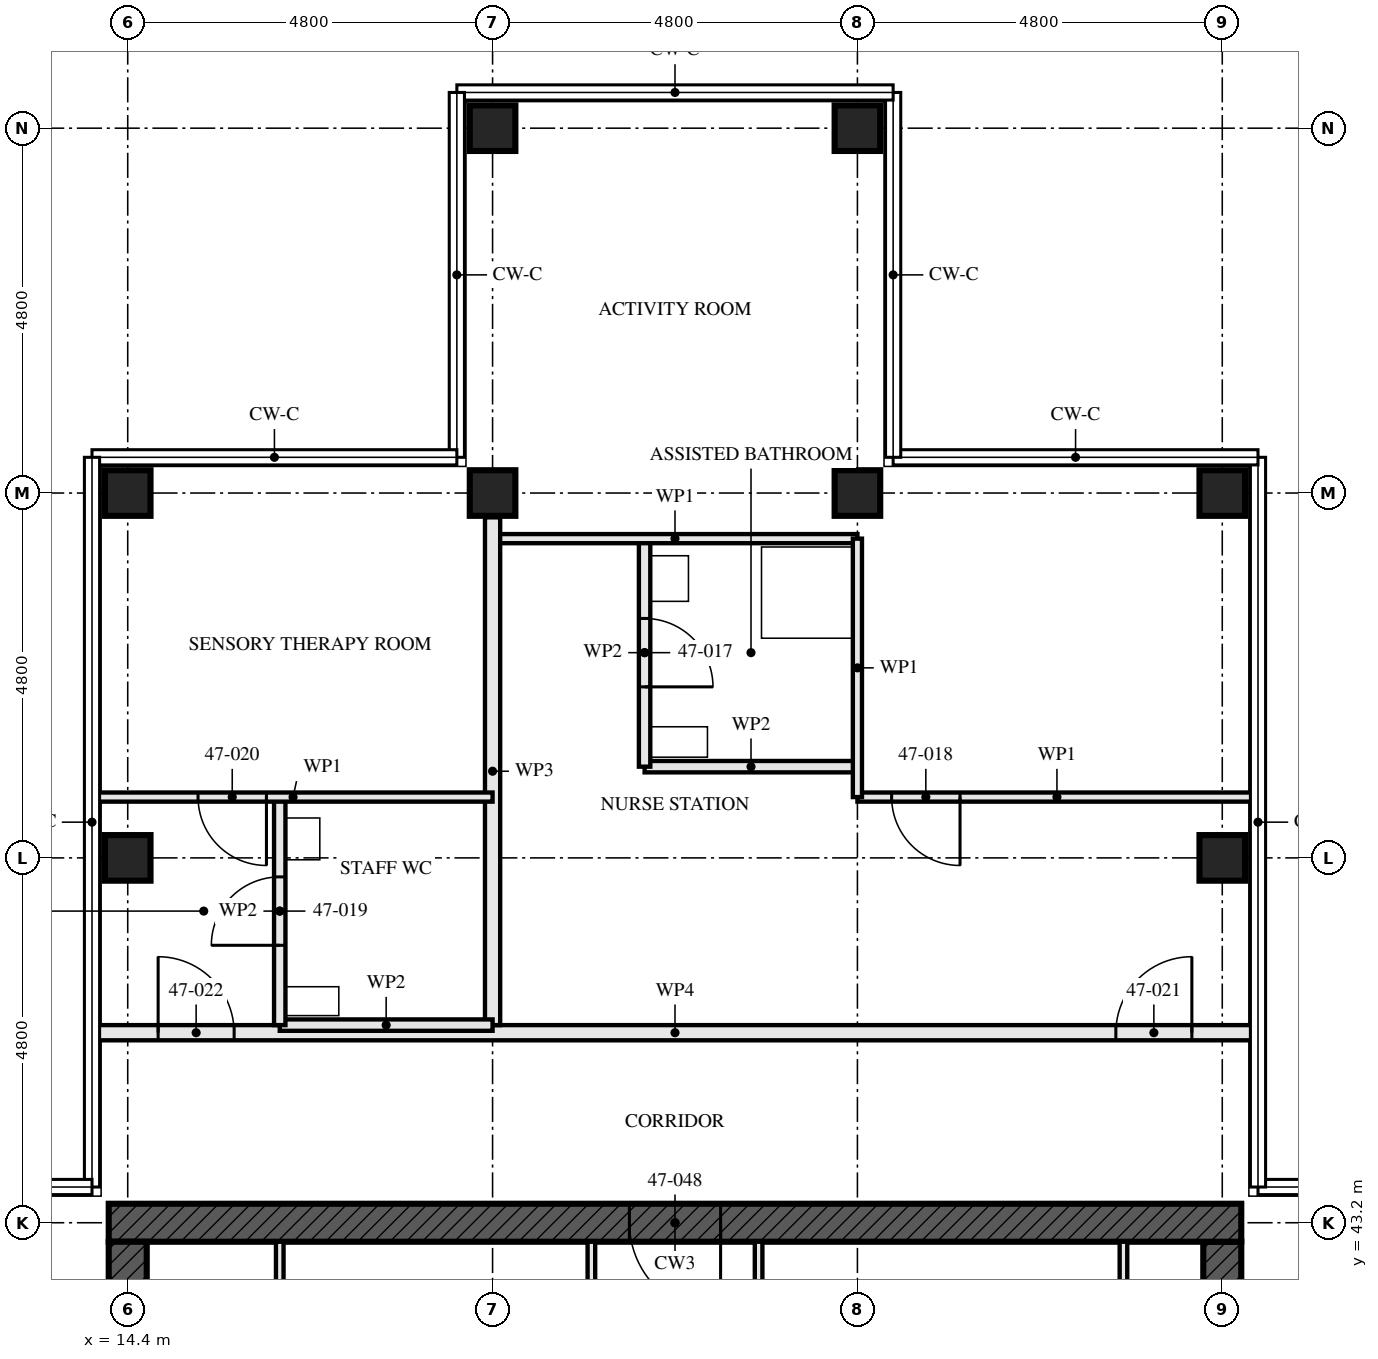
"""IFC4 building model, lengths in metres.
Left out: names, types, materials, properties, quantities, classifications, styles, units other than length and angle.
Written with IfcOpenShell. Run it as: python <this file> out.ifc"""

import sys

from ifc_helpers import new_model, si_unit, direction, frame, frame_2d, origin, origin_2d, place, context, subcontext, project, spatial, rectangle, hollow_rectangle, extrude, element, fill, save


model = new_model("IFC4")
c1 = context("Model", 3, precision=1e-05, world=origin(), true_north=direction((0.0, 1.0)))
c2 = subcontext(c1, "Body", "Model", "MODEL_VIEW")
j1 = project(units=[si_unit("LENGTHUNIT", "METRE"), si_unit("PLANEANGLEUNIT", "RADIAN")], contexts=[c1])
p1 = place(None, origin())
s1 = spatial("IfcSite", under=j1, at=p1, CompositionType="ELEMENT")
p2 = place(p1, origin())
s2 = spatial("IfcBuilding", under=s1, at=p2, CompositionType="ELEMENT")
p3 = place(p2, frame((0.0, 0.0, 172.5)))
s3 = spatial("IfcBuildingStorey", under=s2, at=p3, CompositionType="ELEMENT", Elevation=172.5)
for number, where, z_axis, x_axis in (
    (1, (14.4, 48.0, 0.0), (0.0, 0.0, 1.0), (1.0, 0.0, 0.0)),
    (2, (14.4, 52.8, 0.0), (0.0, 0.0, 1.0), (0.0, 1.0, 0.0)),
    (3, (19.2, 52.8, 0.0), (0.0, 0.0, 1.0), (0.0, 1.0, 0.0)),
    (4, (19.2, 57.6, 0.0), (0.0, 0.0, 1.0), (0.0, 1.0, 0.0)),
    (5, (24.0, 52.8, 0.0), (0.0, 0.0, 1.0), (0.0, 1.0, 0.0)),
    (6, (24.0, 57.6, 0.0), (0.0, 0.0, 1.0), (0.0, 1.0, 0.0)),
    (7, (28.8, 48.0, 0.0), (0.0, 0.0, 1.0), (1.0, 0.0, 0.0)),
    (8, (28.8, 52.8, 0.0), (0.0, 0.0, 1.0), (0.0, 1.0, 0.0)),
):
    element("IfcColumn", number, at=place(p3, frame(where, z_axis=z_axis, x_axis=x_axis)), inside=s3, PredefinedType="COLUMN", context=c2, shape_type="SweptSolid", body=[
        extrude(hollow_rectangle(XDim=0.6, YDim=0.6, WallThickness=0.08, at=origin_2d()), origin(), (0.0, 0.0, 1.0), 3.5),
    ])
p4 = place(p3, frame((29.05, 43.2, -0.17), z_axis=(0.0, 0.0, 1.0), x_axis=(-1.0, 0.0, 0.0)))
e9 = element("IfcWall", 9, at=p4, inside=s3, PredefinedType="SHEAR", context=c2, shape_type="SweptSolid", body=[
    extrude(rectangle(XDim=14.9, YDim=0.5, at=frame_2d((7.45, 0.0))), origin(), (0.0, 0.0, 1.0), 3.5),
])
p5 = place(p4, frame((6.85, 0.0, 0.17)))
e10 = element("IfcOpeningElement", 10, at=p5, cuts=e9, PredefinedType="OPENING", context=c2, shape_type="SweptSolid", body=[
    extrude(rectangle(XDim=1.2, YDim=2.1, at=frame_2d((0.6, 1.05))), frame((0.0, 0.26, 0.0), z_axis=(0.0, -1.0, 0.0), x_axis=(1.0, 0.0, 0.0)), (0.0, 0.0, 1.0), 0.521),
])
p6 = place(p3, frame((14.4, 42.95, -0.17), z_axis=(0.0, 0.0, 1.0), x_axis=(0.0, -1.0, 0.0)))
e11 = element("IfcWall", 11, at=p6, inside=s3, PredefinedType="SHEAR", context=c2, shape_type="SweptSolid", body=[
    extrude(rectangle(XDim=13.9, YDim=0.5, at=frame_2d((6.95, 0.0))), origin(), (0.0, 0.0, 1.0), 3.5),
])
p7 = place(p6, frame((6.35, 0.0, 0.17)))
e12 = element("IfcOpeningElement", 12, at=p7, cuts=e11, PredefinedType="OPENING", context=c2, shape_type="SweptSolid", body=[
    extrude(rectangle(XDim=1.2, YDim=2.1, at=frame_2d((0.6, 1.05))), frame((0.0, 0.26, 0.0), z_axis=(0.0, -1.0, 0.0), x_axis=(1.0, 0.0, 0.0)), (0.0, 0.0, 1.0), 0.521),
])
p8 = place(p3, frame((28.8, 29.05, -0.17), z_axis=(0.0, 0.0, 1.0), x_axis=(0.0, 1.0, 0.0)))
e13 = element("IfcWall", 13, at=p8, inside=s3, PredefinedType="SHEAR", context=c2, shape_type="SweptSolid", body=[
    extrude(rectangle(XDim=13.9, YDim=0.5, at=frame_2d((6.95, 0.0))), origin(), (0.0, 0.0, 1.0), 3.5),
])
p9 = place(p8, frame((6.35, 0.0, 0.17)))
e14 = element("IfcOpeningElement", 14, at=p9, cuts=e13, PredefinedType="OPENING", context=c2, shape_type="SweptSolid", body=[
    extrude(rectangle(XDim=1.2, YDim=2.1, at=frame_2d((0.6, 1.05))), frame((0.0, 0.26, 0.0), z_axis=(0.0, -1.0, 0.0), x_axis=(1.0, 0.0, 0.0)), (0.0, 0.0, 1.0), 0.521),
])
p10 = place(p3, frame((21.2, 52.2, 0.0), z_axis=(0.0, 0.0, 1.0), x_axis=(0.0, -1.0, 0.0)))
e15 = element("IfcWall", 15, at=p10, inside=s3, PredefinedType="PARTITIONING", context=c2, shape_type="SweptSolid", body=[
    extrude(rectangle(XDim=3.0, YDim=0.15, at=frame_2d((1.5, 0.0))), origin(), (0.0, 0.0, 1.0), 3.33),
])
p11 = place(p10, frame((1.05, 0.0, 0.0)))
e16 = element("IfcOpeningElement", 16, at=p11, cuts=e15, PredefinedType="OPENING", context=c2, shape_type="SweptSolid", body=[
    extrude(rectangle(XDim=0.9, YDim=2.1, at=frame_2d((0.45, 1.05))), frame((0.0, 0.085, 0.0), z_axis=(0.0, -1.0, 0.0), x_axis=(1.0, 0.0, 0.0)), (0.0, 0.0, 1.0), 0.171),
])
p12 = place(p3, frame((24.0, 49.2, 0.0), z_axis=(0.0, 0.0, 1.0), x_axis=(-1.0, 0.0, 0.0)))
e17 = element("IfcWall", 17, at=p12, inside=s3, PredefinedType="PARTITIONING", context=c2, shape_type="SweptSolid", body=[
    extrude(rectangle(XDim=2.8, YDim=0.15, at=frame_2d((1.4, 0.0))), origin(), (0.0, 0.0, 1.0), 3.33),
])
p13 = place(p3, frame((29.25, 48.8, 0.0), z_axis=(0.0, 0.0, 1.0), x_axis=(-1.0, 0.0, 0.0)))
e18 = element("IfcWall", 18, at=p13, inside=s3, PredefinedType="PARTITIONING", context=c2, shape_type="SweptSolid", body=[
    extrude(rectangle(XDim=5.25, YDim=0.12, at=frame_2d((2.625, 0.0))), origin(), (0.0, 0.0, 1.0), 2.32),
])
p14 = place(p13, frame((3.9, 0.0, 0.0)))
e19 = element("IfcOpeningElement", 19, at=p14, cuts=e18, PredefinedType="OPENING", context=c2, shape_type="SweptSolid", body=[
    extrude(rectangle(XDim=0.9, YDim=2.1, at=frame_2d((0.45, 1.05))), frame((0.0, 0.071, 0.0), z_axis=(0.0, -1.0, 0.0), x_axis=(1.0, 0.0, 0.0)), (0.0, 0.0, 1.0), 0.141),
])
p15 = place(p3, frame((24.0, 52.2, 0.0), z_axis=(0.0, 0.0, 1.0), x_axis=(-1.0, 0.0, 0.0)))
e20 = element("IfcWall", 20, at=p15, inside=s3, PredefinedType="PARTITIONING", context=c2, shape_type="SweptSolid", body=[
    extrude(rectangle(XDim=4.8, YDim=0.12, at=frame_2d((2.4, 0.0))), origin(), (0.0, 0.0, 1.0), 3.33),
])
p16 = place(p3, frame((24.0, 52.2, 0.0), z_axis=(0.0, 0.0, 1.0), x_axis=(0.0, -1.0, 0.0)))
e21 = element("IfcWall", 21, at=p16, inside=s3, PredefinedType="PARTITIONING", context=c2, shape_type="SweptSolid", body=[
    extrude(rectangle(XDim=3.4, YDim=0.12, at=frame_2d((1.7, 0.0))), origin(), (0.0, 0.0, 1.0), 3.33),
])
p17 = place(p3, frame((19.2, 52.48, 0.0), z_axis=(0.0, 0.0, 1.0), x_axis=(0.0, -1.0, 0.0)))
e22 = element("IfcWall", 22, at=p17, inside=s3, PredefinedType="PARTITIONING", context=c2, shape_type="SweptSolid", body=[
    extrude(rectangle(XDim=6.68, YDim=0.2, at=frame_2d((3.34, 0.0))), origin(), (0.0, 0.0, 1.0), 2.55),
])
p18 = place(p3, frame((16.4, 48.8, 0.0), z_axis=(0.0, 0.0, 1.0), x_axis=(0.0, -1.0, 0.0)))
e23 = element("IfcWall", 23, at=p18, inside=s3, PredefinedType="PARTITIONING", context=c2, shape_type="SweptSolid", body=[
    extrude(rectangle(XDim=3.0, YDim=0.15, at=frame_2d((1.5, 0.0))), origin(), (0.0, 0.0, 1.0), 2.55),
])
p19 = place(p18, frame((1.05, 0.0, 0.0)))
e24 = element("IfcOpeningElement", 24, at=p19, cuts=e23, PredefinedType="OPENING", context=c2, shape_type="SweptSolid", body=[
    extrude(rectangle(XDim=0.9, YDim=2.1, at=frame_2d((0.45, 1.05))), frame((0.0, 0.085, 0.0), z_axis=(0.0, -1.0, 0.0), x_axis=(1.0, 0.0, 0.0)), (0.0, 0.0, 1.0), 0.171),
])
p20 = place(p3, frame((19.2, 45.8, 0.0), z_axis=(0.0, 0.0, 1.0), x_axis=(-1.0, 0.0, 0.0)))
e25 = element("IfcWall", 25, at=p20, inside=s3, PredefinedType="PARTITIONING", context=c2, shape_type="SweptSolid", body=[
    extrude(rectangle(XDim=2.8, YDim=0.15, at=frame_2d((1.4, 0.0))), origin(), (0.0, 0.0, 1.0), 3.33),
])
p21 = place(p3, frame((19.2, 48.8, 0.0), z_axis=(0.0, 0.0, 1.0), x_axis=(-1.0, 0.0, 0.0)))
e26 = element("IfcWall", 26, at=p21, inside=s3, PredefinedType="PARTITIONING", context=c2, shape_type="SweptSolid", body=[
    extrude(rectangle(XDim=5.25, YDim=0.12, at=frame_2d((2.625, 0.0))), origin(), (0.0, 0.0, 1.0), 2.32),
])
p22 = place(p21, frame((2.975, 0.0, 0.0)))
e27 = element("IfcOpeningElement", 27, at=p22, cuts=e26, PredefinedType="OPENING", context=c2, shape_type="SweptSolid", body=[
    extrude(rectangle(XDim=0.9, YDim=2.1, at=frame_2d((0.45, 1.05))), frame((0.0, 0.071, 0.0), z_axis=(0.0, -1.0, 0.0), x_axis=(1.0, 0.0, 0.0)), (0.0, 0.0, 1.0), 0.141),
])
p23 = place(p3, frame((29.25, 45.7, 0.0), z_axis=(0.0, 0.0, 1.0), x_axis=(-1.0, 0.0, 0.0)))
e28 = element("IfcWall", 28, at=p23, inside=s3, PredefinedType="PARTITIONING", context=c2, shape_type="SweptSolid", body=[
    extrude(rectangle(XDim=15.3, YDim=0.2, at=frame_2d((7.65, 0.0))), origin(), (0.0, 0.0, 1.0), 2.32),
])
p24 = place(p23, frame((0.85, 0.0, 0.0)))
e29 = element("IfcOpeningElement", 29, at=p24, cuts=e28, PredefinedType="OPENING", context=c2, shape_type="SweptSolid", body=[
    extrude(rectangle(XDim=1.0, YDim=2.1, at=frame_2d((0.5, 1.05))), frame((0.0, 0.111, 0.0), z_axis=(0.0, -1.0, 0.0), x_axis=(1.0, 0.0, 0.0)), (0.0, 0.0, 1.0), 0.221),
])
p25 = place(p23, frame((13.45, 0.0, 0.0)))
e30 = element("IfcOpeningElement", 30, at=p25, cuts=e28, PredefinedType="OPENING", context=c2, shape_type="SweptSolid", body=[
    extrude(rectangle(XDim=1.0, YDim=2.1, at=frame_2d((0.5, 1.05))), frame((0.0, 0.111, 0.0), z_axis=(0.0, -1.0, 0.0), x_axis=(1.0, 0.0, 0.0)), (0.0, 0.0, 1.0), 0.221),
])
for number, where, z_axis, x_axis in (
    (31, (16.4, 37.15, 0.0), (0.0, 0.0, 1.0), (0.0, 1.0, 0.0)),
    (32, (27.5, 37.15, 0.0), (0.0, 0.0, 1.0), (0.0, 1.0, 0.0)),
):
    element("IfcWall", number, at=place(p3, frame(where, z_axis=z_axis, x_axis=x_axis)), inside=s3, PredefinedType="SOLIDWALL", context=c2, shape_type="SweptSolid", body=[
        extrude(rectangle(XDim=5.8, YDim=0.1, at=frame_2d((2.9, 0.0))), origin(), (0.0, 0.0, 1.0), 3.33),
    ])
p26 = place(p3, frame((20.5, 37.15, 0.0), z_axis=(0.0, 0.0, 1.0), x_axis=(0.0, 1.0, 0.0)))
e33 = element("IfcWall", 33, at=p26, inside=s3, PredefinedType="SOLIDWALL", context=c2, shape_type="SweptSolid", body=[
    extrude(rectangle(XDim=5.8, YDim=0.1, at=frame_2d((2.9, 0.0))), origin(), (0.0, 0.0, 1.0), 3.33),
])
p27 = place(p26, frame((0.975, 0.0, 0.0)))
e34 = element("IfcOpeningElement", 34, at=p27, cuts=e33, PredefinedType="OPENING", context=c2, shape_type="SweptSolid", body=[
    extrude(rectangle(XDim=0.9, YDim=2.1, at=frame_2d((0.45, 1.05))), frame((0.0, 0.061, 0.0), z_axis=(0.0, -1.0, 0.0), x_axis=(1.0, 0.0, 0.0)), (0.0, 0.0, 1.0), 0.121),
])
p28 = place(p3, frame((22.7, 37.15, 0.0), z_axis=(0.0, 0.0, 1.0), x_axis=(0.0, 1.0, 0.0)))
e35 = element("IfcWall", 35, at=p28, inside=s3, PredefinedType="SOLIDWALL", context=c2, shape_type="SweptSolid", body=[
    extrude(rectangle(XDim=5.8, YDim=0.1, at=frame_2d((2.9, 0.0))), origin(), (0.0, 0.0, 1.0), 3.33),
])
p29 = place(p28, frame((0.975, 0.0, 0.0)))
e36 = element("IfcOpeningElement", 36, at=p29, cuts=e35, PredefinedType="OPENING", context=c2, shape_type="SweptSolid", body=[
    extrude(rectangle(XDim=0.9, YDim=2.1, at=frame_2d((0.45, 1.05))), frame((0.0, 0.061, 0.0), z_axis=(0.0, -1.0, 0.0), x_axis=(1.0, 0.0, 0.0)), (0.0, 0.0, 1.0), 0.121),
])
p30 = place(p11, origin())
e37 = element("IfcDoor", 37, at=p30, inside=s3, OperationType="SINGLE_SWING_LEFT", PredefinedType="DOOR", context=c2, shape_type="SweptSolid", body=[
    extrude(rectangle(XDim=0.9, YDim=2.1, at=frame_2d((0.45, 1.05))), frame((0.0, 0.022, 0.0), z_axis=(0.0, -1.0, 0.0), x_axis=(1.0, 0.0, 0.0)), (0.0, 0.0, 1.0), 0.044),
])
fill(e16, e37)
p31 = place(p14, origin())
e38 = element("IfcDoor", 38, at=p31, inside=s3, OperationType="SINGLE_SWING_RIGHT", PredefinedType="DOOR", context=c2, shape_type="SweptSolid", body=[
    extrude(rectangle(XDim=0.9, YDim=2.1, at=frame_2d((0.45, 1.05))), frame((0.0, 0.022, 0.0), z_axis=(0.0, -1.0, 0.0), x_axis=(1.0, 0.0, 0.0)), (0.0, 0.0, 1.0), 0.044),
])
fill(e19, e38)
p32 = place(p19, frame((0.9, 0.0, 0.0), z_axis=(0.0, 0.0, 1.0), x_axis=(-1.0, 0.0, 0.0)))
e39 = element("IfcDoor", 39, at=p32, inside=s3, OperationType="SINGLE_SWING_RIGHT", PredefinedType="DOOR", context=c2, shape_type="SweptSolid", body=[
    extrude(rectangle(XDim=0.9, YDim=2.1, at=frame_2d((0.45, 1.05))), frame((0.0, 0.022, 0.0), z_axis=(0.0, -1.0, 0.0), x_axis=(1.0, 0.0, 0.0)), (0.0, 0.0, 1.0), 0.044),
])
fill(e24, e39)
p33 = place(p22, origin())
e40 = element("IfcDoor", 40, at=p33, inside=s3, OperationType="SINGLE_SWING_RIGHT", PredefinedType="DOOR", context=c2, shape_type="SweptSolid", body=[
    extrude(rectangle(XDim=0.9, YDim=2.1, at=frame_2d((0.45, 1.05))), frame((0.0, 0.022, 0.0), z_axis=(0.0, -1.0, 0.0), x_axis=(1.0, 0.0, 0.0)), (0.0, 0.0, 1.0), 0.044),
])
fill(e27, e40)
p34 = place(p24, frame((1.0, 0.0, 0.0), z_axis=(0.0, 0.0, 1.0), x_axis=(-1.0, 0.0, 0.0)))
e41 = element("IfcDoor", 41, at=p34, inside=s3, OperationType="SINGLE_SWING_LEFT", PredefinedType="DOOR", context=c2, shape_type="SweptSolid", body=[
    extrude(rectangle(XDim=1.0, YDim=2.1, at=frame_2d((0.5, 1.05))), frame((0.0, 0.027, 0.0), z_axis=(0.0, -1.0, 0.0), x_axis=(1.0, 0.0, 0.0)), (0.0, 0.0, 1.0), 0.054),
])
fill(e29, e41)
p35 = place(p25, frame((1.0, 0.0, 0.0), z_axis=(0.0, 0.0, 1.0), x_axis=(-1.0, 0.0, 0.0)))
e42 = element("IfcDoor", 42, at=p35, inside=s3, OperationType="SINGLE_SWING_RIGHT", PredefinedType="DOOR", context=c2, shape_type="SweptSolid", body=[
    extrude(rectangle(XDim=1.0, YDim=2.1, at=frame_2d((0.5, 1.05))), frame((0.0, 0.027, 0.0), z_axis=(0.0, -1.0, 0.0), x_axis=(1.0, 0.0, 0.0)), (0.0, 0.0, 1.0), 0.054),
])
fill(e30, e42)
p36 = place(p5, origin())
e43 = element("IfcDoor", 43, at=p36, inside=s3, OperationType="SINGLE_SWING_LEFT", PredefinedType="DOOR", context=c2, shape_type="SweptSolid", body=[
    extrude(rectangle(XDim=1.2, YDim=2.1, at=frame_2d((0.6, 1.05))), frame((0.0, 0.027, 0.0), z_axis=(0.0, -1.0, 0.0), x_axis=(1.0, 0.0, 0.0)), (0.0, 0.0, 1.0), 0.054),
])
fill(e10, e43)
save(model, sys.argv[1])
